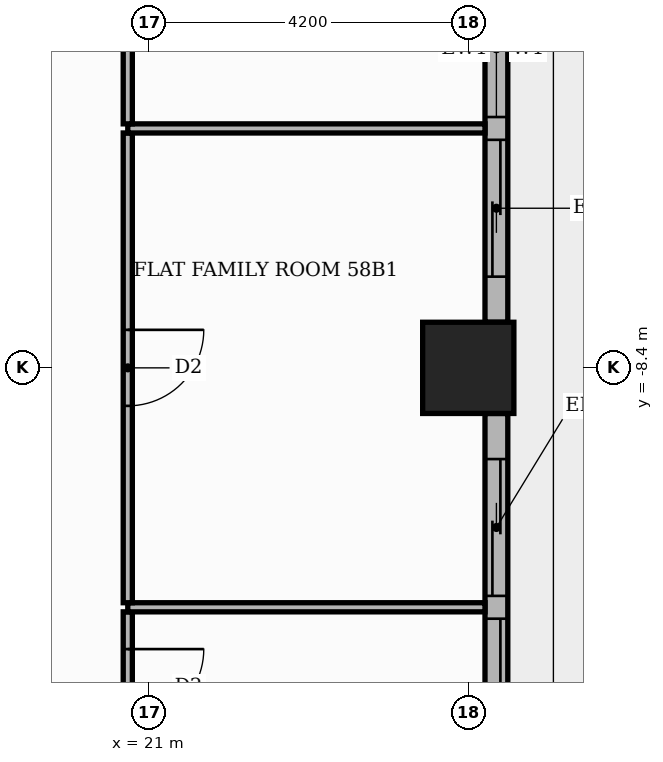
"""IFC4 building model, lengths in metres.
Left out: names, types, materials, properties, quantities, classifications, styles, units other than length and angle.
Written with IfcOpenShell. Run it as: python <this file> out.ifc"""

import sys

from ifc_helpers import new_model, si_unit, direction, frame, frame_2d, origin, origin_2d, place, context, subcontext, project, spatial, rectangle, extrude, element, fill, save


model = new_model("IFC4")
c1 = context("Model", 3, precision=1e-05, world=origin(), true_north=direction((0.0, 1.0)))
c2 = subcontext(c1, "Body", "Model", "MODEL_VIEW")
j1 = project(units=[si_unit("LENGTHUNIT", "METRE"), si_unit("PLANEANGLEUNIT", "RADIAN")], contexts=[c1])
p1 = place(None, origin())
s1 = spatial("IfcSite", under=j1, at=p1, CompositionType="ELEMENT")
p2 = place(p1, origin())
s2 = spatial("IfcBuilding", under=s1, at=p2, CompositionType="ELEMENT")
p3 = place(p2, frame((0.0, 0.0, 244.5)))
s3 = spatial("IfcBuildingStorey", under=s2, at=p3, CompositionType="ELEMENT", Elevation=244.5)
p4 = place(p3, frame((25.2, -8.4, 0.0), z_axis=(0.0, 0.0, 1.0), x_axis=(1.0, 0.0, 0.0)))
e1 = element("IfcColumn", 1, at=p4, inside=s3, PredefinedType="COLUMN", context=c2, shape_type="SweptSolid", body=[
    extrude(rectangle(XDim=1.2, YDim=1.2, at=origin_2d()), origin(), (0.0, 0.0, 1.0), 3.9),
])
p5 = place(p3, frame((25.57, -16.2, 0.0), z_axis=(0.0, 0.0, 1.0), x_axis=(0.0, 1.0, 0.0)))
e2 = element("IfcWall", 2, at=p5, inside=s3, PredefinedType="STANDARD", context=c2, shape_type="SweptSolid", body=[
    extrude(rectangle(XDim=7.2, YDim=0.3, at=frame_2d((3.6, 0.0))), origin(), (0.0, 0.0, 1.0), 3.48),
])
p6 = place(p5, frame((0.6, 0.0, 0.0)))
e3 = element("IfcOpeningElement", 3, at=p6, cuts=e2, PredefinedType="OPENING", context=c2, shape_type="SweptSolid", body=[
    extrude(rectangle(XDim=3.9, YDim=2.4, at=frame_2d((1.95, 1.2))), frame((0.0, 0.16, 0.0), z_axis=(0.0, -1.0, 0.0), x_axis=(1.0, 0.0, 0.0)), (0.0, 0.0, 1.0), 0.32),
])
p7 = place(p5, frame((4.8, 0.0, 0.0)))
e4 = element("IfcOpeningElement", 4, at=p7, cuts=e2, PredefinedType="OPENING", context=c2, shape_type="SweptSolid", body=[
    extrude(rectangle(XDim=1.8, YDim=2.4, at=frame_2d((0.9, 1.2))), frame((0.0, 0.16, 0.0), z_axis=(0.0, -1.0, 0.0), x_axis=(1.0, 0.0, 0.0)), (0.0, 0.0, 1.0), 0.32),
])
p8 = place(p3, frame((25.57, -7.8, 0.0), z_axis=(0.0, 0.0, 1.0), x_axis=(0.0, 1.0, 0.0)))
e5 = element("IfcWall", 5, at=p8, inside=s3, PredefinedType="STANDARD", context=c2, shape_type="SweptSolid", body=[
    extrude(rectangle(XDim=7.2, YDim=0.3, at=frame_2d((3.6, 0.0))), origin(), (0.0, 0.0, 1.0), 3.48),
])
p9 = place(p8, frame((0.6, 0.0, 0.0)))
e6 = element("IfcOpeningElement", 6, at=p9, cuts=e5, PredefinedType="OPENING", context=c2, shape_type="SweptSolid", body=[
    extrude(rectangle(XDim=1.8, YDim=2.4, at=frame_2d((0.9, 1.2))), frame((0.0, 0.16, 0.0), z_axis=(0.0, -1.0, 0.0), x_axis=(1.0, 0.0, 0.0)), (0.0, 0.0, 1.0), 0.32),
])
p10 = place(p8, frame((2.7, 0.0, 0.9)))
e7 = element("IfcOpeningElement", 7, at=p10, cuts=e5, PredefinedType="OPENING", context=c2, shape_type="SweptSolid", body=[
    extrude(rectangle(XDim=1.8, YDim=2.1, at=frame_2d((0.9, 1.05))), frame((0.0, 0.16, 0.0), z_axis=(0.0, -1.0, 0.0), x_axis=(1.0, 0.0, 0.0)), (0.0, 0.0, 1.0), 0.32),
])
p11 = place(p8, frame((4.8, 0.0, 0.0)))
e8 = element("IfcOpeningElement", 8, at=p11, cuts=e5, PredefinedType="OPENING", context=c2, shape_type="SweptSolid", body=[
    extrude(rectangle(XDim=1.8, YDim=2.4, at=frame_2d((0.9, 1.2))), frame((0.0, 0.16, 0.0), z_axis=(0.0, -1.0, 0.0), x_axis=(1.0, 0.0, 0.0)), (0.0, 0.0, 1.0), 0.32),
])
p12 = place(p3, frame((20.72, -13.59, 0.0), z_axis=(0.0, 0.0, 1.0), x_axis=(0.0, 1.0, 0.0)))
e9 = element("IfcWall", 9, at=p12, inside=s3, PredefinedType="PARTITIONING", context=c2, shape_type="SweptSolid", body=[
    extrude(rectangle(XDim=1.98, YDim=0.12, at=frame_2d((0.99, 0.0))), origin(), (0.0, 0.0, 1.0), 3.48),
])
p13 = place(p12, frame((0.49, 0.0, 0.0)))
e10 = element("IfcOpeningElement", 10, at=p13, cuts=e9, PredefinedType="OPENING", context=c2, shape_type="SweptSolid", body=[
    extrude(rectangle(XDim=1.0, YDim=2.1, at=frame_2d((0.5, 1.05))), frame((0.0, 0.07, 0.0), z_axis=(0.0, -1.0, 0.0), x_axis=(1.0, 0.0, 0.0)), (0.0, 0.0, 1.0), 0.14),
])
p14 = place(p3, frame((20.72, -11.55, 0.0), z_axis=(0.0, 0.0, 1.0), x_axis=(1.0, 0.0, 0.0)))
e11 = element("IfcWall", 11, at=p14, inside=s3, PredefinedType="PARTITIONING", context=c2, shape_type="SweptSolid", body=[
    extrude(rectangle(XDim=4.7, YDim=0.12, at=frame_2d((2.35, 0.0))), origin(), (0.0, 0.0, 1.0), 3.48),
])
p15 = place(p3, frame((20.72, -11.49, 0.0), z_axis=(0.0, 0.0, 1.0), x_axis=(0.0, 1.0, 0.0)))
e12 = element("IfcWall", 12, at=p15, inside=s3, PredefinedType="PARTITIONING", context=c2, shape_type="SweptSolid", body=[
    extrude(rectangle(XDim=6.18, YDim=0.12, at=frame_2d((3.09, 0.0))), origin(), (0.0, 0.0, 1.0), 3.48),
])
p16 = place(p15, frame((2.59, 0.0, 0.0)))
e13 = element("IfcOpeningElement", 13, at=p16, cuts=e12, PredefinedType="OPENING", context=c2, shape_type="SweptSolid", body=[
    extrude(rectangle(XDim=1.0, YDim=2.1, at=frame_2d((0.5, 1.05))), frame((0.0, 0.07, 0.0), z_axis=(0.0, -1.0, 0.0), x_axis=(1.0, 0.0, 0.0)), (0.0, 0.0, 1.0), 0.14),
])
p17 = place(p3, frame((20.72, -5.25, 0.0), z_axis=(0.0, 0.0, 1.0), x_axis=(1.0, 0.0, 0.0)))
e14 = element("IfcWall", 14, at=p17, inside=s3, PredefinedType="PARTITIONING", context=c2, shape_type="SweptSolid", body=[
    extrude(rectangle(XDim=4.7, YDim=0.12, at=frame_2d((2.35, 0.0))), origin(), (0.0, 0.0, 1.0), 3.48),
])
p18 = place(p3, frame((20.72, -5.19, 0.0), z_axis=(0.0, 0.0, 1.0), x_axis=(0.0, 1.0, 0.0)))
e15 = element("IfcWall", 15, at=p18, inside=s3, PredefinedType="PARTITIONING", context=c2, shape_type="SweptSolid", body=[
    extrude(rectangle(XDim=8.28, YDim=0.12, at=frame_2d((4.14, 0.0))), origin(), (0.0, 0.0, 1.0), 3.48),
])
p19 = place(p18, frame((3.69, 0.0, 0.0)))
e16 = element("IfcOpeningElement", 16, at=p19, cuts=e15, PredefinedType="OPENING", context=c2, shape_type="SweptSolid", body=[
    extrude(rectangle(XDim=0.9, YDim=2.1, at=frame_2d((0.45, 1.05))), frame((0.0, 0.07, 0.0), z_axis=(0.0, -1.0, 0.0), x_axis=(1.0, 0.0, 0.0)), (0.0, 0.0, 1.0), 0.14),
])
p20 = place(p6, origin())
e17 = element("IfcDoor", 17, at=p20, inside=s3, OperationType="SLIDING_TO_LEFT", PredefinedType="DOOR", context=c2, shape_type="SweptSolid", body=[
    extrude(rectangle(XDim=3.9, YDim=2.4, at=frame_2d((1.95, 1.2))), frame((0.0, 0.025, 0.0), z_axis=(0.0, -1.0, 0.0), x_axis=(1.0, 0.0, 0.0)), (0.0, 0.0, 1.0), 0.05),
])
fill(e3, e17)
p21 = place(p7, origin())
e18 = element("IfcDoor", 18, at=p21, inside=s3, OperationType="SLIDING_TO_RIGHT", PredefinedType="DOOR", context=c2, shape_type="SweptSolid", body=[
    extrude(rectangle(XDim=1.8, YDim=2.4, at=frame_2d((0.9, 1.2))), frame((0.0, 0.025, 0.0), z_axis=(0.0, -1.0, 0.0), x_axis=(1.0, 0.0, 0.0)), (0.0, 0.0, 1.0), 0.05),
])
fill(e4, e18)
p22 = place(p9, origin())
e19 = element("IfcDoor", 19, at=p22, inside=s3, OperationType="SLIDING_TO_LEFT", PredefinedType="DOOR", context=c2, shape_type="SweptSolid", body=[
    extrude(rectangle(XDim=1.8, YDim=2.4, at=frame_2d((0.9, 1.2))), frame((0.0, 0.025, 0.0), z_axis=(0.0, -1.0, 0.0), x_axis=(1.0, 0.0, 0.0)), (0.0, 0.0, 1.0), 0.05),
])
fill(e6, e19)
p23 = place(p10, origin())
e20 = element("IfcWindow", 20, at=p23, inside=s3, PartitioningType="SINGLE_PANEL", PredefinedType="WINDOW", context=c2, shape_type="SweptSolid", body=[
    extrude(rectangle(XDim=1.8, YDim=2.1, at=frame_2d((0.9, 1.05))), frame((0.0, 0.03, 0.0), z_axis=(0.0, -1.0, 0.0), x_axis=(1.0, 0.0, 0.0)), (0.0, 0.0, 1.0), 0.06),
])
fill(e7, e20)
p24 = place(p13, frame((1.0, 0.0, 0.0), z_axis=(0.0, 0.0, 1.0), x_axis=(-1.0, 0.0, 0.0)))
e21 = element("IfcDoor", 21, at=p24, inside=s3, OperationType="SINGLE_SWING_RIGHT", PredefinedType="DOOR", context=c2, shape_type="SweptSolid", body=[
    extrude(rectangle(XDim=1.0, YDim=2.1, at=frame_2d((0.5, 1.05))), frame((0.0, 0.025, 0.0), z_axis=(0.0, -1.0, 0.0), x_axis=(1.0, 0.0, 0.0)), (0.0, 0.0, 1.0), 0.05),
])
fill(e10, e21)
p25 = place(p16, frame((1.0, 0.0, 0.0), z_axis=(0.0, 0.0, 1.0), x_axis=(-1.0, 0.0, 0.0)))
e22 = element("IfcDoor", 22, at=p25, inside=s3, OperationType="SINGLE_SWING_RIGHT", PredefinedType="DOOR", context=c2, shape_type="SweptSolid", body=[
    extrude(rectangle(XDim=1.0, YDim=2.1, at=frame_2d((0.5, 1.05))), frame((0.0, 0.025, 0.0), z_axis=(0.0, -1.0, 0.0), x_axis=(1.0, 0.0, 0.0)), (0.0, 0.0, 1.0), 0.05),
])
fill(e13, e22)
save(model, sys.argv[1])
